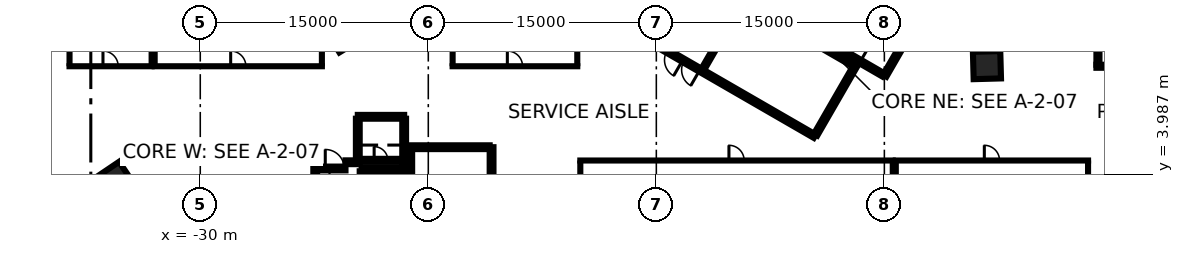
"""IFC4 building model, lengths in metres.
Left out: names, types, materials, properties, quantities, classifications, styles, units other than length and angle.
Written with IfcOpenShell. Run it as: python <this file> out.ifc"""

import sys

from ifc_helpers import new_model, si_unit, direction, frame, frame_2d, origin, origin_2d, place, context, subcontext, project, spatial, rectangle, extrude, element, fill, save


model = new_model("IFC4")
c1 = context("Model", 3, precision=1e-05, world=origin(), true_north=direction((0.0, 1.0)))
c2 = subcontext(c1, "Body", "Model", "MODEL_VIEW")
j1 = project(units=[si_unit("LENGTHUNIT", "METRE"), si_unit("PLANEANGLEUNIT", "RADIAN")], contexts=[c1])
p1 = place(None, origin())
s1 = spatial("IfcSite", under=j1, at=p1, CompositionType="ELEMENT")
p2 = place(p1, origin())
s2 = spatial("IfcBuilding", under=s1, at=p2, CompositionType="ELEMENT")
p3 = place(p2, frame((0.0, 0.0, -3.6)))
s3 = spatial("IfcBuildingStorey", under=s2, at=p3, CompositionType="ELEMENT", Elevation=-3.6)
for number, where, z_axis, x_axis in (
    (1, (21.749, 11.174, -0.4), (0.0, 0.0, 1.0), (1.0, 0.027, 0.0)),
    (2, (-35.583, 3.565, -0.4), (0.0, 0.0, 1.0), (-0.559, 0.829, 0.0)),
):
    element("IfcColumn", number, at=place(p3, frame(where, z_axis=z_axis, x_axis=x_axis)), inside=s3, PredefinedType="COLUMN", context=c2, shape_type="SweptSolid", body=[
        extrude(rectangle(XDim=1.8, YDim=1.8, at=origin_2d()), origin(), (0.0, 0.0, 1.0), 3.55),
    ])
p4 = place(p3, frame((-10.837, 5.775, 0.0), z_axis=(0.0, 0.0, 1.0), x_axis=(0.0, -1.0, 0.0)))
e3 = element("IfcWall", 3, at=p4, inside=s3, PredefinedType="SHEAR", context=c2, shape_type="SweptSolid", body=[
    extrude(rectangle(XDim=11.55, YDim=0.25, at=frame_2d((5.775, 0.0))), origin(), (0.0, 0.0, 1.0), 3.15),
])
p5 = place(p4, frame((10.025, 0.0, 0.0)))
e4 = element("IfcOpeningElement", 4, at=p5, cuts=e3, PredefinedType="OPENING", context=c2, shape_type="SweptSolid", body=[
    extrude(rectangle(XDim=1.2, YDim=2.1, at=frame_2d((0.6, 1.05))), frame((0.0, 0.135, 0.0), z_axis=(0.0, -1.0, 0.0), x_axis=(1.0, 0.0, 0.0)), (0.0, 0.0, 1.0), 0.27),
])
p6 = place(p4, frame((8.725, 0.0, 0.0)))
e5 = element("IfcOpeningElement", 5, at=p6, cuts=e3, PredefinedType="OPENING", context=c2, shape_type="SweptSolid", body=[
    extrude(rectangle(XDim=1.2, YDim=2.1, at=frame_2d((0.6, 1.05))), frame((0.0, 0.135, 0.0), z_axis=(0.0, -1.0, 0.0), x_axis=(1.0, 0.0, 0.0)), (0.0, 0.0, 1.0), 0.27),
])
p7 = place(p3, frame((-16.472, 5.775, 0.0), z_axis=(0.0, 0.0, 1.0), x_axis=(1.0, 0.0, 0.0)))
e6 = element("IfcWall", 6, at=p7, inside=s3, PredefinedType="SHEAR", context=c2, shape_type="SweptSolid", body=[
    extrude(rectangle(XDim=5.51, YDim=0.25, at=frame_2d((2.755, 0.0))), origin(), (0.0, 0.0, 1.0), 3.15),
])
p8 = place(p3, frame((-19.637, 7.775, 0.0), z_axis=(0.0, 0.0, 1.0), x_axis=(1.0, 0.0, 0.0)))
e7 = element("IfcWall", 7, at=p8, inside=s3, PredefinedType="SHEAR", context=c2, shape_type="SweptSolid", body=[
    extrude(rectangle(XDim=3.05, YDim=0.25, at=frame_2d((1.525, 0.0))), origin(), (0.0, 0.0, 1.0), 3.15),
])
for number, where, z_axis, x_axis in (
    (8, (-16.587, 7.65, 0.0), (0.0, 0.0, 1.0), (0.0, -1.0, 0.0)),
    (9, (-19.637, 4.785, 0.0), (0.0, 0.0, 1.0), (0.0, 1.0, 0.0)),
):
    element("IfcWall", number, at=place(p3, frame(where, z_axis=z_axis, x_axis=x_axis)), inside=s3, PredefinedType="SHEAR", context=c2, shape_type="SweptSolid", body=[
        extrude(rectangle(XDim=2.865, YDim=0.25, at=frame_2d((1.432, 0.0))), origin(), (0.0, 0.0, 1.0), 3.15),
    ])
p9 = place(p3, frame((-16.302, 4.315, 0.0), z_axis=(0.0, 0.0, 1.0), x_axis=(-1.0, 0.0, 0.0)))
e10 = element("IfcWall", 10, at=p9, inside=s3, PredefinedType="SHEAR", context=c2, shape_type="SweptSolid", body=[
    extrude(rectangle(XDim=3.085, YDim=0.25, at=frame_2d((1.542, 0.0))), origin(), (0.0, 0.0, 1.0), 3.15),
])
p10 = place(p3, frame((-16.187, 3.2, 0.0), z_axis=(0.0, 0.0, 1.0), x_axis=(0.0, 1.0, 0.0)))
e11 = element("IfcWall", 11, at=p10, inside=s3, PredefinedType="SHEAR", context=c2, shape_type="SweptSolid", body=[
    extrude(rectangle(XDim=2.449, YDim=0.25, at=frame_2d((1.225, 0.0))), origin(), (0.0, 0.0, 1.0), 3.15),
])
p11 = place(p3, frame((-22.437, 2.4, 0.0), z_axis=(0.0, 0.0, 1.0), x_axis=(0.0, 1.0, 0.0)))
e12 = element("IfcWall", 12, at=p11, inside=s3, PredefinedType="SHEAR", context=c2, shape_type="SweptSolid", body=[
    extrude(rectangle(XDim=1.975, YDim=0.25, at=frame_2d((0.987, 0.0))), origin(), (0.0, 0.0, 1.0), 3.15),
])
p12 = place(p3, frame((-22.312, 4.375, 0.0), z_axis=(0.0, 0.0, 1.0), x_axis=(1.0, 0.0, 0.0)))
e13 = element("IfcWall", 13, at=p12, inside=s3, PredefinedType="SHEAR", context=c2, shape_type="SweptSolid", body=[
    extrude(rectangle(XDim=1.865, YDim=0.25, at=frame_2d((0.932, 0.0))), origin(), (0.0, 0.0, 1.0), 3.15),
])
p13 = place(p12, frame((0.535, 0.0, 0.0)))
e14 = element("IfcOpeningElement", 14, at=p13, cuts=e13, PredefinedType="OPENING", context=c2, shape_type="SweptSolid", body=[
    extrude(rectangle(XDim=1.25, YDim=2.1, at=frame_2d((0.625, 1.05))), frame((0.0, 0.135, 0.0), z_axis=(0.0, -1.0, 0.0), x_axis=(1.0, 0.0, 0.0)), (0.0, 0.0, 1.0), 0.27),
])
p14 = place(p3, frame((-19.387, 4.19, 0.0), z_axis=(0.0, 0.0, 1.0), x_axis=(0.0, -1.0, 0.0)))
e15 = element("IfcWall", 15, at=p14, inside=s3, PredefinedType="SHEAR", context=c2, shape_type="SweptSolid", body=[
    extrude(rectangle(XDim=0.989, YDim=0.25, at=frame_2d((0.495, 0.0))), origin(), (0.0, 0.0, 1.0), 3.15),
])
p15 = place(p3, frame((-20.447, 4.785, 0.0), z_axis=(0.0, 0.0, 1.0), x_axis=(1.0, 0.0, 0.0)))
e16 = element("IfcWall", 16, at=p15, inside=s3, PredefinedType="SHEAR", context=c2, shape_type="SweptSolid", body=[
    extrude(rectangle(XDim=0.685, YDim=0.25, at=frame_2d((0.342, 0.0))), origin(), (0.0, 0.0, 1.0), 3.15),
])
p16 = place(p3, frame((-16.577, 4.785, 0.0), z_axis=(0.0, 0.0, 1.0), x_axis=(0.0, -1.0, 0.0)))
e17 = element("IfcWall", 17, at=p16, inside=s3, PredefinedType="SHEAR", context=c2, shape_type="SweptSolid", body=[
    extrude(rectangle(XDim=0.344, YDim=0.25, at=frame_2d((0.172, 0.0))), origin(), (0.0, 0.0, 1.0), 3.15),
])
p17 = place(p3, frame((-19.511, 4.91, 0.0), z_axis=(0.0, 0.0, 1.0), x_axis=(1.0, 0.0, 0.0)))
e18 = element("IfcWall", 18, at=p17, inside=s3, PredefinedType="SHEAR", context=c2, shape_type="SweptSolid", body=[
    extrude(rectangle(XDim=2.798, YDim=0.2, at=frame_2d((1.399, 0.0))), origin(), (0.0, 0.0, 1.0), 3.15),
])
p18 = place(p17, frame((0.949, 0.0, 0.0)))
e19 = element("IfcOpeningElement", 19, at=p18, cuts=e18, PredefinedType="OPENING", context=c2, shape_type="SweptSolid", body=[
    extrude(rectangle(XDim=0.9, YDim=2.1, at=frame_2d((0.45, 1.05))), frame((0.0, 0.11, 0.0), z_axis=(0.0, -1.0, 0.0), x_axis=(1.0, 0.0, 0.0)), (0.0, 0.0, 1.0), 0.22),
])
p19 = place(p3, frame((10.42, 6.498, 0.0), z_axis=(0.0, 0.0, 1.0), x_axis=(-0.866021906294, 0.500006057782, 0.0)))
e20 = element("IfcWall", 20, at=p19, inside=s3, PredefinedType="SHEAR", context=c2, shape_type="SweptSolid", body=[
    extrude(rectangle(XDim=11.55, YDim=0.25, at=frame_2d((5.775, 0.0))), origin(), (0.0, 0.0, 1.0), 3.15),
])
p20 = place(p19, frame((10.025, 0.0, 0.0)))
e21 = element("IfcOpeningElement", 21, at=p20, cuts=e20, PredefinedType="OPENING", context=c2, shape_type="SweptSolid", body=[
    extrude(rectangle(XDim=1.2, YDim=2.1, at=frame_2d((0.6, 1.05))), frame((0.0, 0.135, 0.0), z_axis=(0.0, -1.0, 0.0), x_axis=(1.0, 0.0, 0.0)), (0.0, 0.0, 1.0), 0.27),
])
p21 = place(p19, frame((8.725, 0.0, 0.0)))
e22 = element("IfcOpeningElement", 22, at=p21, cuts=e20, PredefinedType="OPENING", context=c2, shape_type="SweptSolid", body=[
    extrude(rectangle(XDim=1.2, YDim=2.1, at=frame_2d((0.6, 1.05))), frame((0.0, 0.135, 0.0), z_axis=(0.0, -1.0, 0.0), x_axis=(1.0, 0.0, 0.0)), (0.0, 0.0, 1.0), 0.27),
])
p22 = place(p3, frame((13.238, 11.378, 0.0), z_axis=(0.0, 0.0, 1.0), x_axis=(-0.500008851346, -0.866020293397, 0.0)))
e23 = element("IfcWall", 23, at=p22, inside=s3, PredefinedType="SHEAR", context=c2, shape_type="SweptSolid", body=[
    extrude(rectangle(XDim=5.51, YDim=0.25, at=frame_2d((2.755, 0.0))), origin(), (0.0, 0.0, 1.0), 3.15),
])
p23 = place(p3, frame((16.552, 13.119, 0.0), z_axis=(0.0, 0.0, 1.0), x_axis=(-0.499978833458, -0.866037623948, 0.0)))
e24 = element("IfcWall", 24, at=p23, inside=s3, PredefinedType="SHEAR", context=c2, shape_type="SweptSolid", body=[
    extrude(rectangle(XDim=3.05, YDim=0.25, at=frame_2d((1.525, 0.0))), origin(), (0.0, 0.0, 1.0), 3.15),
])
p24 = place(p3, frame((14.918, 10.54, 0.0), z_axis=(0.0, 0.0, 1.0), x_axis=(-0.866063538972, 0.499933942099, 0.0)))
e25 = element("IfcWall", 25, at=p24, inside=s3, PredefinedType="SHEAR", context=c2, shape_type="SweptSolid", body=[
    extrude(rectangle(XDim=2.865, YDim=0.25, at=frame_2d((1.432, 0.0))), origin(), (0.0, 0.0, 1.0), 3.15),
])
p25 = place(p3, frame((11.888, 11.961, 0.0), z_axis=(0.0, 0.0, 1.0), x_axis=(0.500003324108, 0.866023484601, 0.0)))
e26 = element("IfcWall", 26, at=p25, inside=s3, PredefinedType="SHEAR", context=c2, shape_type="SweptSolid", body=[
    extrude(rectangle(XDim=3.085, YDim=0.25, at=frame_2d((1.542, 0.0))), origin(), (0.0, 0.0, 1.0), 3.15),
])
p26 = place(p3, frame((10.865, 12.418, 0.0), z_axis=(0.0, 0.0, 1.0), x_axis=(0.866026229868, -0.499998569178, 0.0)))
e27 = element("IfcWall", 27, at=p26, inside=s3, PredefinedType="SHEAR", context=c2, shape_type="SweptSolid", body=[
    extrude(rectangle(XDim=2.449, YDim=0.25, at=frame_2d((1.225, 0.0))), origin(), (0.0, 0.0, 1.0), 3.15),
])
p27 = place(p3, frame((12.433, 11.964, 0.0), z_axis=(0.0, 0.0, 1.0), x_axis=(-0.866055875208, 0.499947218231, 0.0)))
e28 = element("IfcWall", 28, at=p27, inside=s3, PredefinedType="SHEAR", context=c2, shape_type="SweptSolid", body=[
    extrude(rectangle(XDim=0.345, YDim=0.25, at=frame_2d((0.172, 0.0))), origin(), (0.0, 0.0, 1.0), 3.15),
])
p28 = place(p3, frame((3.057, 10.895, 0.0), z_axis=(0.0, 0.0, 1.0), x_axis=(0.500012186204, 0.866018367962, 0.0)))
e29 = element("IfcWall", 29, at=p28, inside=s3, PredefinedType="SHEAR", context=c2, shape_type="SweptSolid", body=[
    extrude(rectangle(XDim=5.349, YDim=0.2, at=frame_2d((2.674, 0.0))), origin(), (0.0, 0.0, 1.0), 3.15),
])
p29 = place(p28, frame((2.099, 0.0, 0.0)))
e30 = element("IfcOpeningElement", 30, at=p29, cuts=e29, PredefinedType="OPENING", context=c2, shape_type="SweptSolid", body=[
    extrude(rectangle(XDim=0.9, YDim=2.1, at=frame_2d((0.45, 1.05))), frame((0.0, 0.11, 0.0), z_axis=(0.0, -1.0, 0.0), x_axis=(1.0, 0.0, 0.0)), (0.0, 0.0, 1.0), 0.22),
])
p30 = place(p3, frame((14.008, 14.442, 0.0), z_axis=(0.0, 0.0, 1.0), x_axis=(-0.499986818241, -0.866033014143, 0.0)))
e31 = element("IfcWall", 31, at=p30, inside=s3, PredefinedType="SHEAR", context=c2, shape_type="SweptSolid", body=[
    extrude(rectangle(XDim=2.798, YDim=0.2, at=frame_2d((1.399, 0.0))), origin(), (0.0, 0.0, 1.0), 3.15),
])
p31 = place(p30, frame((0.949, 0.0, 0.0)))
e32 = element("IfcOpeningElement", 32, at=p31, cuts=e31, PredefinedType="OPENING", context=c2, shape_type="SweptSolid", body=[
    extrude(rectangle(XDim=0.9, YDim=2.1, at=frame_2d((0.45, 1.05))), frame((0.0, 0.11, 0.0), z_axis=(0.0, -1.0, 0.0), x_axis=(1.0, 0.0, 0.0)), (0.0, 0.0, 1.0), 0.22),
])
p32 = place(p3, frame((-5.1, 4.9, 0.0), z_axis=(0.0, 0.0, 1.0), x_axis=(1.0, 0.0, 0.0)))
e33 = element("IfcWall", 33, at=p32, inside=s3, PredefinedType="PARTITIONING", context=c2, shape_type="SweptSolid", body=[
    extrude(rectangle(XDim=20.753, YDim=0.2, at=frame_2d((10.376, 0.0))), origin(), (0.0, 0.0, 1.0), 3.15),
])
p33 = place(p32, frame((9.876, 0.0, 0.0)))
e34 = element("IfcOpeningElement", 34, at=p33, cuts=e33, PredefinedType="OPENING", context=c2, shape_type="SweptSolid", body=[
    extrude(rectangle(XDim=1.0, YDim=2.1, at=frame_2d((0.5, 1.05))), frame((0.0, 0.11, 0.0), z_axis=(0.0, -1.0, 0.0), x_axis=(1.0, 0.0, 0.0)), (0.0, 0.0, 1.0), 0.22),
])
p34 = place(p3, frame((-5.0, 0.6, 0.0), z_axis=(0.0, 0.0, 1.0), x_axis=(0.0, 1.0, 0.0)))
e35 = element("IfcWall", 35, at=p34, inside=s3, PredefinedType="PARTITIONING", context=c2, shape_type="SweptSolid", body=[
    extrude(rectangle(XDim=4.2, YDim=0.2, at=frame_2d((2.1, 0.0))), origin(), (0.0, 0.0, 1.0), 3.15),
])
p35 = place(p3, frame((15.553, 0.2, 0.0), z_axis=(0.0, 0.0, 1.0), x_axis=(0.0, 1.0, 0.0)))
e36 = element("IfcWall", 36, at=p35, inside=s3, PredefinedType="PARTITIONING", context=c2, shape_type="SweptSolid", body=[
    extrude(rectangle(XDim=4.6, YDim=0.2, at=frame_2d((2.3, 0.0))), origin(), (0.0, 0.0, 1.0), 3.15),
])
p36 = place(p3, frame((15.653, 4.9, 0.0), z_axis=(0.0, 0.0, 1.0), x_axis=(1.0, 0.0, 0.0)))
e37 = element("IfcWall", 37, at=p36, inside=s3, PredefinedType="PARTITIONING", context=c2, shape_type="SweptSolid", body=[
    extrude(rectangle(XDim=12.847, YDim=0.2, at=frame_2d((6.424, 0.0))), origin(), (0.0, 0.0, 1.0), 3.15),
])
p37 = place(p36, frame((5.924, 0.0, 0.0)))
e38 = element("IfcOpeningElement", 38, at=p37, cuts=e37, PredefinedType="OPENING", context=c2, shape_type="SweptSolid", body=[
    extrude(rectangle(XDim=1.0, YDim=2.1, at=frame_2d((0.5, 1.05))), frame((0.0, 0.11, 0.0), z_axis=(0.0, -1.0, 0.0), x_axis=(1.0, 0.0, 0.0)), (0.0, 0.0, 1.0), 0.22),
])
p38 = place(p3, frame((15.753, 0.2, 0.0), z_axis=(0.0, 0.0, 1.0), x_axis=(0.0, 1.0, 0.0)))
e39 = element("IfcWall", 39, at=p38, inside=s3, PredefinedType="PARTITIONING", context=c2, shape_type="SweptSolid", body=[
    extrude(rectangle(XDim=4.6, YDim=0.2, at=frame_2d((2.3, 0.0))), origin(), (0.0, 0.0, 1.0), 3.15),
])
p39 = place(p3, frame((28.4, 0.4, 0.0), z_axis=(0.0, 0.0, 1.0), x_axis=(0.0, 1.0, 0.0)))
e40 = element("IfcWall", 40, at=p39, inside=s3, PredefinedType="PARTITIONING", context=c2, shape_type="SweptSolid", body=[
    extrude(rectangle(XDim=4.4, YDim=0.2, at=frame_2d((2.2, 0.0))), origin(), (0.0, 0.0, 1.0), 3.15),
])
p40 = place(p3, frame((-38.7, 11.1, 0.0), z_axis=(0.0, 0.0, 1.0), x_axis=(1.0, 0.0, 0.0)))
e41 = element("IfcWall", 41, at=p40, inside=s3, PredefinedType="PARTITIONING", context=c2, shape_type="SweptSolid", body=[
    extrude(rectangle(XDim=5.6, YDim=0.2, at=frame_2d((2.8, 0.0))), origin(), (0.0, 0.0, 1.0), 3.15),
])
p41 = place(p40, frame((2.3, 0.0, 0.0)))
e42 = element("IfcOpeningElement", 42, at=p41, cuts=e41, PredefinedType="OPENING", context=c2, shape_type="SweptSolid", body=[
    extrude(rectangle(XDim=1.0, YDim=2.1, at=frame_2d((0.5, 1.05))), frame((0.0, 0.11, 0.0), z_axis=(0.0, -1.0, 0.0), x_axis=(1.0, 0.0, 0.0)), (0.0, 0.0, 1.0), 0.22),
])
p42 = place(p3, frame((-38.6, 11.2, 0.0), z_axis=(0.0, 0.0, 1.0), x_axis=(0.0, 1.0, 0.0)))
e43 = element("IfcWall", 43, at=p42, inside=s3, PredefinedType="PARTITIONING", context=c2, shape_type="SweptSolid", body=[
    extrude(rectangle(XDim=4.2, YDim=0.2, at=frame_2d((2.1, 0.0))), origin(), (0.0, 0.0, 1.0), 3.15),
])
p43 = place(p3, frame((-33.2, 11.2, 0.0), z_axis=(0.0, 0.0, 1.0), x_axis=(0.0, 1.0, 0.0)))
e44 = element("IfcWall", 44, at=p43, inside=s3, PredefinedType="PARTITIONING", context=c2, shape_type="SweptSolid", body=[
    extrude(rectangle(XDim=4.6, YDim=0.2, at=frame_2d((2.3, 0.0))), origin(), (0.0, 0.0, 1.0), 3.15),
])
p44 = place(p3, frame((-33.1, 11.1, 0.0), z_axis=(0.0, 0.0, 1.0), x_axis=(1.0, 0.0, 0.0)))
e45 = element("IfcWall", 45, at=p44, inside=s3, PredefinedType="PARTITIONING", context=c2, shape_type="SweptSolid", body=[
    extrude(rectangle(XDim=11.2, YDim=0.2, at=frame_2d((5.6, 0.0))), origin(), (0.0, 0.0, 1.0), 3.15),
])
p45 = place(p44, frame((5.1, 0.0, 0.0)))
e46 = element("IfcOpeningElement", 46, at=p45, cuts=e45, PredefinedType="OPENING", context=c2, shape_type="SweptSolid", body=[
    extrude(rectangle(XDim=1.0, YDim=2.1, at=frame_2d((0.5, 1.05))), frame((0.0, 0.11, 0.0), z_axis=(0.0, -1.0, 0.0), x_axis=(1.0, 0.0, 0.0)), (0.0, 0.0, 1.0), 0.22),
])
p46 = place(p3, frame((-33.0, 11.2, 0.0), z_axis=(0.0, 0.0, 1.0), x_axis=(0.0, 1.0, 0.0)))
e47 = element("IfcWall", 47, at=p46, inside=s3, PredefinedType="PARTITIONING", context=c2, shape_type="SweptSolid", body=[
    extrude(rectangle(XDim=4.6, YDim=0.2, at=frame_2d((2.3, 0.0))), origin(), (0.0, 0.0, 1.0), 3.15),
])
p47 = place(p3, frame((-22.0, 11.2, 0.0), z_axis=(0.0, 0.0, 1.0), x_axis=(0.0, 1.0, 0.0)))
e48 = element("IfcWall", 48, at=p47, inside=s3, PredefinedType="PARTITIONING", context=c2, shape_type="SweptSolid", body=[
    extrude(rectangle(XDim=4.2, YDim=0.2, at=frame_2d((2.1, 0.0))), origin(), (0.0, 0.0, 1.0), 3.15),
])
p48 = place(p3, frame((-13.5, 11.1, 0.0), z_axis=(0.0, 0.0, 1.0), x_axis=(1.0, 0.0, 0.0)))
e49 = element("IfcWall", 49, at=p48, inside=s3, PredefinedType="PARTITIONING", context=c2, shape_type="SweptSolid", body=[
    extrude(rectangle(XDim=8.4, YDim=0.2, at=frame_2d((4.2, 0.0))), origin(), (0.0, 0.0, 1.0), 3.15),
])
p49 = place(p48, frame((3.7, 0.0, 0.0)))
e50 = element("IfcOpeningElement", 50, at=p49, cuts=e49, PredefinedType="OPENING", context=c2, shape_type="SweptSolid", body=[
    extrude(rectangle(XDim=1.0, YDim=2.1, at=frame_2d((0.5, 1.05))), frame((0.0, 0.11, 0.0), z_axis=(0.0, -1.0, 0.0), x_axis=(1.0, 0.0, 0.0)), (0.0, 0.0, 1.0), 0.22),
])
for number, where, z_axis, x_axis in (
    (51, (-13.4, 11.2, 0.0), (0.0, 0.0, 1.0), (0.0, 1.0, 0.0)),
    (52, (-5.2, 11.2, 0.0), (0.0, 0.0, 1.0), (0.0, 1.0, 0.0)),
):
    element("IfcWall", number, at=place(p3, frame(where, z_axis=z_axis, x_axis=x_axis)), inside=s3, PredefinedType="PARTITIONING", context=c2, shape_type="SweptSolid", body=[
        extrude(rectangle(XDim=4.2, YDim=0.2, at=frame_2d((2.1, 0.0))), origin(), (0.0, 0.0, 1.0), 3.15),
    ])
p50 = place(p3, frame((29.05, 11.2, 0.0), z_axis=(0.0, 0.0, 1.0), x_axis=(0.0, 1.0, 0.0)))
e53 = element("IfcWall", 53, at=p50, inside=s3, PredefinedType="SOLIDWALL", context=c2, shape_type="SweptSolid", body=[
    extrude(rectangle(XDim=9.6, YDim=0.2, at=frame_2d((4.8, 0.0))), origin(), (0.0, 0.0, 1.0), 3.15),
])
p51 = place(p3, frame((33.5, 11.1, 0.0), z_axis=(0.0, 0.0, 1.0), x_axis=(-1.0, 0.0, 0.0)))
e54 = element("IfcWall", 54, at=p51, inside=s3, PredefinedType="SOLIDWALL", context=c2, shape_type="SweptSolid", body=[
    extrude(rectangle(XDim=4.55, YDim=0.2, at=frame_2d((2.275, 0.0))), origin(), (0.0, 0.0, 1.0), 3.15),
])
p52 = place(p13, origin())
e55 = element("IfcDoor", 55, at=p52, inside=s3, OperationType="SINGLE_SWING_LEFT", PredefinedType="DOOR", context=c2, shape_type="SweptSolid", body=[
    extrude(rectangle(XDim=1.25, YDim=2.1, at=frame_2d((0.625, 1.05))), frame((0.0, 0.025, 0.0), z_axis=(0.0, -1.0, 0.0), x_axis=(1.0, 0.0, 0.0)), (0.0, 0.0, 1.0), 0.05),
])
fill(e14, e55)
p53 = place(p18, origin())
e56 = element("IfcDoor", 56, at=p53, inside=s3, OperationType="SINGLE_SWING_LEFT", PredefinedType="DOOR", context=c2, shape_type="SweptSolid", body=[
    extrude(rectangle(XDim=0.9, YDim=2.1, at=frame_2d((0.45, 1.05))), frame((0.0, 0.025, 0.0), z_axis=(0.0, -1.0, 0.0), x_axis=(1.0, 0.0, 0.0)), (0.0, 0.0, 1.0), 0.05),
])
fill(e19, e56)
p54 = place(p20, origin())
e57 = element("IfcDoor", 57, at=p54, inside=s3, OperationType="SINGLE_SWING_LEFT", PredefinedType="DOOR", context=c2, shape_type="SweptSolid", body=[
    extrude(rectangle(XDim=1.2, YDim=2.1, at=frame_2d((0.6, 1.05))), frame((0.0, 0.025, 0.0), z_axis=(0.0, -1.0, 0.0), x_axis=(1.0, 0.0, 0.0)), (0.0, 0.0, 1.0), 0.05),
])
fill(e21, e57)
p55 = place(p21, origin())
e58 = element("IfcDoor", 58, at=p55, inside=s3, OperationType="SINGLE_SWING_RIGHT", PredefinedType="DOOR", context=c2, shape_type="SweptSolid", body=[
    extrude(rectangle(XDim=1.2, YDim=2.1, at=frame_2d((0.6, 1.05))), frame((0.0, 0.025, 0.0), z_axis=(0.0, -1.0, 0.0), x_axis=(1.0, 0.0, 0.0)), (0.0, 0.0, 1.0), 0.05),
])
fill(e22, e58)
p56 = place(p33, origin())
e59 = element("IfcDoor", 59, at=p56, inside=s3, OperationType="SINGLE_SWING_LEFT", PredefinedType="DOOR", context=c2, shape_type="SweptSolid", body=[
    extrude(rectangle(XDim=1.0, YDim=2.1, at=frame_2d((0.5, 1.05))), frame((0.0, 0.025, 0.0), z_axis=(0.0, -1.0, 0.0), x_axis=(1.0, 0.0, 0.0)), (0.0, 0.0, 1.0), 0.05),
])
fill(e34, e59)
p57 = place(p37, origin())
e60 = element("IfcDoor", 60, at=p57, inside=s3, OperationType="SINGLE_SWING_LEFT", PredefinedType="DOOR", context=c2, shape_type="SweptSolid", body=[
    extrude(rectangle(XDim=1.0, YDim=2.1, at=frame_2d((0.5, 1.05))), frame((0.0, 0.025, 0.0), z_axis=(0.0, -1.0, 0.0), x_axis=(1.0, 0.0, 0.0)), (0.0, 0.0, 1.0), 0.05),
])
fill(e38, e60)
p58 = place(p41, origin())
e61 = element("IfcDoor", 61, at=p58, inside=s3, OperationType="SINGLE_SWING_LEFT", PredefinedType="DOOR", context=c2, shape_type="SweptSolid", body=[
    extrude(rectangle(XDim=1.0, YDim=2.1, at=frame_2d((0.5, 1.05))), frame((0.0, 0.025, 0.0), z_axis=(0.0, -1.0, 0.0), x_axis=(1.0, 0.0, 0.0)), (0.0, 0.0, 1.0), 0.05),
])
fill(e42, e61)
p59 = place(p45, origin())
e62 = element("IfcDoor", 62, at=p59, inside=s3, OperationType="SINGLE_SWING_LEFT", PredefinedType="DOOR", context=c2, shape_type="SweptSolid", body=[
    extrude(rectangle(XDim=1.0, YDim=2.1, at=frame_2d((0.5, 1.05))), frame((0.0, 0.025, 0.0), z_axis=(0.0, -1.0, 0.0), x_axis=(1.0, 0.0, 0.0)), (0.0, 0.0, 1.0), 0.05),
])
fill(e46, e62)
p60 = place(p49, origin())
e63 = element("IfcDoor", 63, at=p60, inside=s3, OperationType="SINGLE_SWING_LEFT", PredefinedType="DOOR", context=c2, shape_type="SweptSolid", body=[
    extrude(rectangle(XDim=1.0, YDim=2.1, at=frame_2d((0.5, 1.05))), frame((0.0, 0.025, 0.0), z_axis=(0.0, -1.0, 0.0), x_axis=(1.0, 0.0, 0.0)), (0.0, 0.0, 1.0), 0.05),
])
fill(e50, e63)
save(model, sys.argv[1])
